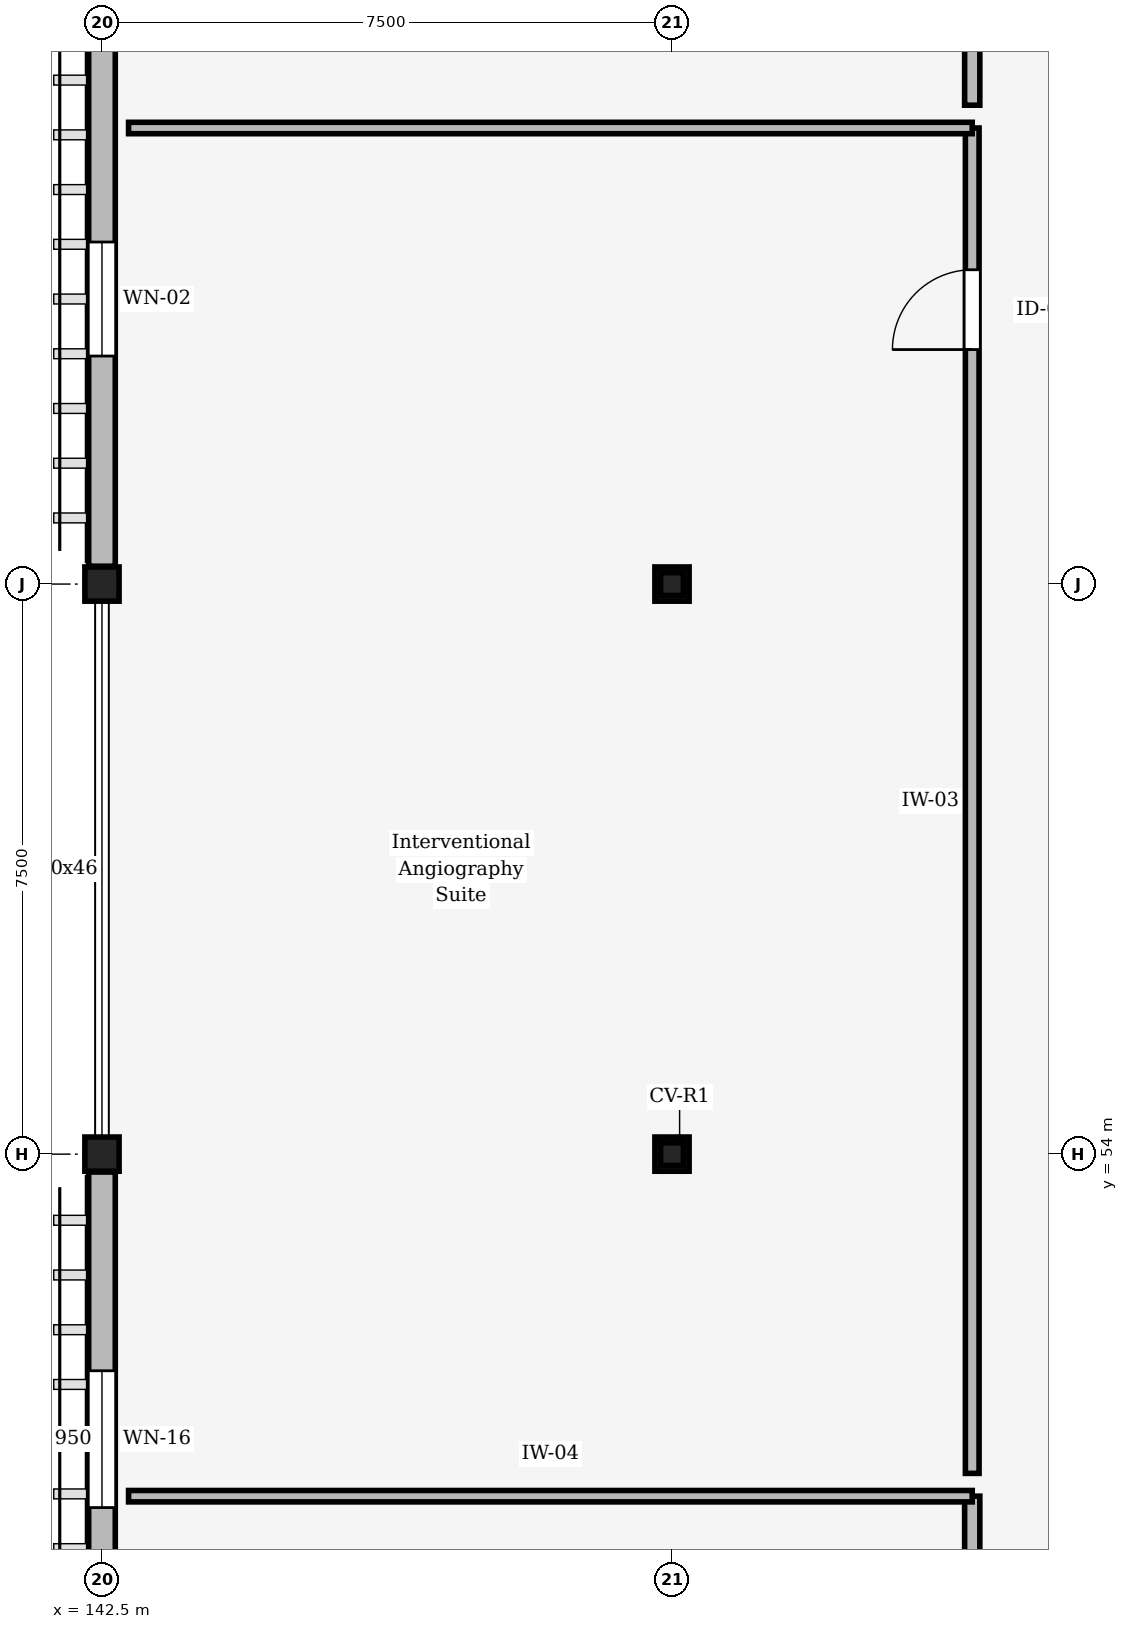
"""IFC4 building model, lengths in metres.
Left out: names, types, materials, properties, quantities, classifications, styles, units other than length and angle.
Written with IfcOpenShell. Run it as: python <this file> out.ifc"""

import sys

from ifc_helpers import new_model, si_unit, direction, frame, frame_2d, origin, origin_2d, place, context, subcontext, project, spatial, rectangle, i_section, extrude, element, fill, save


model = new_model("IFC4")
c1 = context("Model", 3, precision=1e-05, world=origin(), true_north=direction((0.0, 1.0)))
c2 = subcontext(c1, "Body", "Model", "MODEL_VIEW")
j1 = project(units=[si_unit("LENGTHUNIT", "METRE"), si_unit("PLANEANGLEUNIT", "RADIAN")], contexts=[c1])
p1 = place(None, origin())
s1 = spatial("IfcSite", under=j1, at=p1, CompositionType="ELEMENT")
p2 = place(p1, origin())
s2 = spatial("IfcBuilding", under=s1, at=p2, CompositionType="ELEMENT")
p3 = place(p2, frame((0.0, 0.0, 9.3)))
s3 = spatial("IfcBuildingStorey", under=s2, at=p3, CompositionType="ELEMENT", Elevation=9.3)
for number, where, z_axis, x_axis in (
    (1, (142.5, 54.0, 0.0), (0.0, 0.0, 1.0), (1.0, 0.0, 0.0)),
    (2, (142.5, 61.5, 0.0), (0.0, 0.0, 1.0), (1.0, 0.0, 0.0)),
    (3, (150.0, 54.0, 0.0), (0.0, 0.0, 1.0), (1.0, 0.0, 0.0)),
    (4, (150.0, 61.5, 0.0), (0.0, 0.0, 1.0), (1.0, 0.0, 0.0)),
):
    element("IfcColumn", number, at=place(p3, frame(where, z_axis=z_axis, x_axis=x_axis)), inside=s3, PredefinedType="COLUMN", context=c2, shape_type="SweptSolid", body=[
        extrude(rectangle(XDim=0.45, YDim=0.45, at=origin_2d()), origin(), (0.0, 0.0, 1.0), 4.8),
    ])
for number, where, z_axis, x_axis in (
    (5, (150.0, 54.0, 4.8), (0.0, 0.0, 1.0), (1.0, 0.0, 0.0)),
    (6, (150.0, 61.5, 4.8), (0.0, 0.0, 1.0), (1.0, 0.0, 0.0)),
):
    element("IfcColumn", number, at=place(p3, frame(where, z_axis=z_axis, x_axis=x_axis)), inside=s3, PredefinedType="COLUMN", context=c2, shape_type="SweptSolid", body=[
        extrude(i_section(OverallWidth=0.3, OverallDepth=0.3, WebThickness=0.011, FlangeThickness=0.019, FilletRadius=0.027, at=origin_2d()), origin(), (0.0, 0.0, 1.0), 1.872),
    ])
p4 = place(p3, frame((142.5, 46.735, 0.0), z_axis=(0.0, 0.0, 1.0), x_axis=(0.0, 1.0, 0.0)))
e7 = element("IfcWall", 7, at=p4, inside=s3, PredefinedType="STANDARD", context=c2, shape_type="SweptSolid", body=[
    extrude(rectangle(XDim=7.03, YDim=0.35, at=frame_2d((3.515, 0.0))), origin(), (0.0, 0.0, 1.0), 4.55),
])
p5 = place(p4, frame((2.615, 0.0, 0.9)))
e8 = element("IfcOpeningElement", 8, at=p5, cuts=e7, PredefinedType="OPENING", context=c2, shape_type="SweptSolid", body=[
    extrude(rectangle(XDim=1.8, YDim=1.8, at=frame_2d((0.9, 0.9))), frame((0.0, 0.185, 0.0), z_axis=(0.0, -1.0, 0.0), x_axis=(1.0, 0.0, 0.0)), (0.0, 0.0, 1.0), 0.37),
])
p6 = place(p3, frame((142.5, 61.735, 0.0), z_axis=(0.0, 0.0, 1.0), x_axis=(0.0, 1.0, 0.0)))
e9 = element("IfcWall", 9, at=p6, inside=s3, PredefinedType="STANDARD", context=c2, shape_type="SweptSolid", body=[
    extrude(rectangle(XDim=7.03, YDim=0.35, at=frame_2d((3.515, 0.0))), origin(), (0.0, 0.0, 1.0), 4.55),
])
p7 = place(p6, frame((2.765, 0.0, 0.9)))
e10 = element("IfcOpeningElement", 10, at=p7, cuts=e9, PredefinedType="OPENING", context=c2, shape_type="SweptSolid", body=[
    extrude(rectangle(XDim=1.5, YDim=2.4, at=frame_2d((0.75, 1.2))), frame((0.0, 0.185, 0.0), z_axis=(0.0, -1.0, 0.0), x_axis=(1.0, 0.0, 0.0)), (0.0, 0.0, 1.0), 0.37),
])
p8 = place(p3, frame((153.95, 31.85, 0.0), z_axis=(0.0, 0.0, 1.0), x_axis=(0.0, 1.0, 0.0)))
e11 = element("IfcWall", 11, at=p8, inside=s3, PredefinedType="STANDARD", context=c2, shape_type="SweptSolid", body=[
    extrude(rectangle(XDim=17.65, YDim=0.2, at=frame_2d((8.825, 0.0))), origin(), (0.0, 0.0, 1.0), 4.535),
])
p9 = place(p8, frame((9.91, 0.0, 0.0)))
e12 = element("IfcOpeningElement", 12, at=p9, cuts=e11, PredefinedType="OPENING", context=c2, shape_type="SweptSolid", body=[
    extrude(rectangle(XDim=1.05, YDim=2.2, at=frame_2d((0.525, 1.1))), frame((0.0, 0.11, 0.0), z_axis=(0.0, -1.0, 0.0), x_axis=(1.0, 0.0, 0.0)), (0.0, 0.0, 1.0), 0.22),
])
p10 = place(p3, frame((153.95, 49.8, 0.0), z_axis=(0.0, 0.0, 1.0), x_axis=(0.0, 1.0, 0.0)))
e13 = element("IfcWall", 13, at=p10, inside=s3, PredefinedType="PARTITIONING", context=c2, shape_type="SweptSolid", body=[
    extrude(rectangle(XDim=17.7, YDim=0.18, at=frame_2d((8.85, 0.0))), origin(), (0.0, 0.0, 1.0), 4.535),
])
p11 = place(p10, frame((14.785, 0.0, 0.0)))
e14 = element("IfcOpeningElement", 14, at=p11, cuts=e13, PredefinedType="OPENING", context=c2, shape_type="SweptSolid", body=[
    extrude(rectangle(XDim=1.05, YDim=2.2, at=frame_2d((0.525, 1.1))), frame((0.0, 0.1, 0.0), z_axis=(0.0, -1.0, 0.0), x_axis=(1.0, 0.0, 0.0)), (0.0, 0.0, 1.0), 0.2),
])
p12 = place(p3, frame((153.95, 67.8, 0.0), z_axis=(0.0, 0.0, 1.0), x_axis=(0.0, 1.0, 0.0)))
e15 = element("IfcWall", 15, at=p12, inside=s3, PredefinedType="STANDARD", context=c2, shape_type="SweptSolid", body=[
    extrude(rectangle(XDim=17.35, YDim=0.2, at=frame_2d((8.675, 0.0))), origin(), (0.0, 0.0, 1.0), 4.535),
])
p13 = place(p12, frame((12.89, 0.0, 0.0)))
e16 = element("IfcOpeningElement", 16, at=p13, cuts=e15, PredefinedType="OPENING", context=c2, shape_type="SweptSolid", body=[
    extrude(rectangle(XDim=1.05, YDim=2.2, at=frame_2d((0.525, 1.1))), frame((0.0, 0.11, 0.0), z_axis=(0.0, -1.0, 0.0), x_axis=(1.0, 0.0, 0.0)), (0.0, 0.0, 1.0), 0.22),
])
for number, where, z_axis, x_axis in (
    (17, (142.85, 49.5, 0.0), (0.0, 0.0, 1.0), (1.0, 0.0, 0.0)),
    (18, (142.85, 67.5, 0.0), (0.0, 0.0, 1.0), (1.0, 0.0, 0.0)),
):
    element("IfcWall", number, at=place(p3, frame(where, z_axis=z_axis, x_axis=x_axis)), inside=s3, PredefinedType="PARTITIONING", context=c2, shape_type="SweptSolid", body=[
        extrude(rectangle(XDim=11.1, YDim=0.15, at=frame_2d((5.55, 0.0))), origin(), (0.0, 0.0, 1.0), 4.535),
    ])
p14 = place(p5, origin())
e19 = element("IfcWindow", 19, at=p14, inside=s3, PartitioningType="SINGLE_PANEL", PredefinedType="WINDOW", context=c2, shape_type="SweptSolid", body=[
    extrude(rectangle(XDim=1.8, YDim=1.8, at=frame_2d((0.9, 0.9))), frame((0.0, 0.03, 0.0), z_axis=(0.0, -1.0, 0.0), x_axis=(1.0, 0.0, 0.0)), (0.0, 0.0, 1.0), 0.06),
])
fill(e8, e19)
p15 = place(p7, origin())
e20 = element("IfcWindow", 20, at=p15, inside=s3, PartitioningType="SINGLE_PANEL", PredefinedType="WINDOW", context=c2, shape_type="SweptSolid", body=[
    extrude(rectangle(XDim=1.5, YDim=2.4, at=frame_2d((0.75, 1.2))), frame((0.0, 0.03, 0.0), z_axis=(0.0, -1.0, 0.0), x_axis=(1.0, 0.0, 0.0)), (0.0, 0.0, 1.0), 0.06),
])
fill(e10, e20)
p16 = place(p11, origin())
e21 = element("IfcDoor", 21, at=p16, inside=s3, OperationType="SINGLE_SWING_LEFT", PredefinedType="DOOR", context=c2, shape_type="SweptSolid", body=[
    extrude(rectangle(XDim=1.05, YDim=2.2, at=frame_2d((0.525, 1.1))), frame((0.0, 0.025, 0.0), z_axis=(0.0, -1.0, 0.0), x_axis=(1.0, 0.0, 0.0)), (0.0, 0.0, 1.0), 0.05),
])
fill(e14, e21)
save(model, sys.argv[1])
